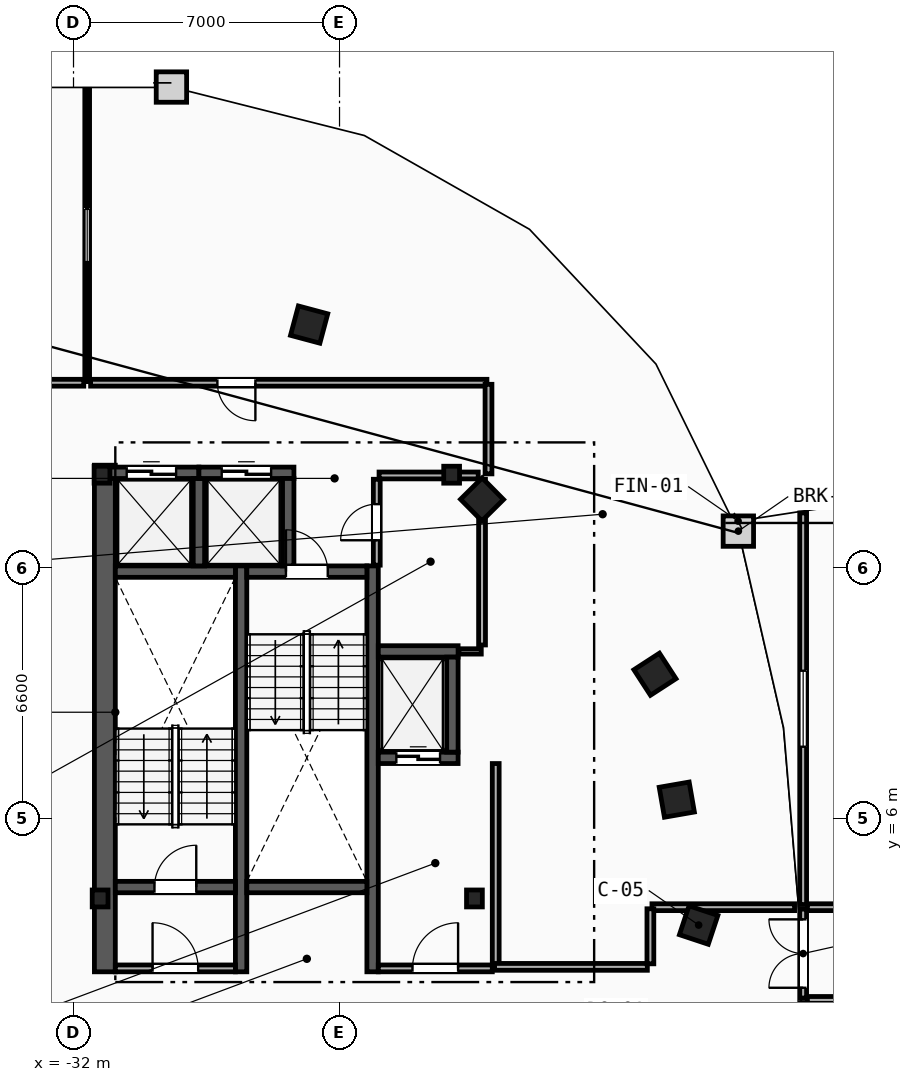
"""IFC4 building model, lengths in metres.
Left out: names, types, materials, properties, quantities, classifications, styles, units other than length and angle.
Written with IfcOpenShell. Run it as: python <this file> out.ifc"""

import sys

from ifc_helpers import new_model, si_unit, direction, frame, frame_2d, origin, origin_2d, place, context, subcontext, project, spatial, rectangle, i_section, extrude, element, fill, save


model = new_model("IFC4")
c1 = context("Model", 3, precision=1e-05, world=origin(), true_north=direction((0.0, 1.0)))
c2 = subcontext(c1, "Body", "Model", "MODEL_VIEW")
j1 = project(units=[si_unit("LENGTHUNIT", "METRE"), si_unit("PLANEANGLEUNIT", "RADIAN")], contexts=[c1])
p1 = place(None, origin())
s1 = spatial("IfcSite", under=j1, at=p1, CompositionType="ELEMENT")
p2 = place(p1, origin())
s2 = spatial("IfcBuilding", under=s1, at=p2, CompositionType="ELEMENT")
p3 = place(p2, frame((0.0, 0.0, 272.0)))
s3 = spatial("IfcBuildingStorey", under=s2, at=p3, CompositionType="ELEMENT", Elevation=272.0)
for number, where, z_axis, x_axis in (
    (1, (-31.3, 3.9, 0.0), (0.0, 0.0, 1.0), (1.0, 0.0, 0.0)),
    (2, (-21.45, 3.9, 0.0), (0.0, 0.0, 1.0), (1.0, 0.0, 0.0)),
    (3, (-22.05, 15.05, 0.0), (0.0, 0.0, 1.0), (1.0, 0.0, 0.0)),
    (4, (-31.25, 15.05, 0.0), (0.0, 0.0, 1.0), (1.0, 0.0, 0.0)),
):
    element("IfcColumn", number, at=place(p3, frame(where, z_axis=z_axis, x_axis=x_axis)), inside=s3, PredefinedType="COLUMN", context=c2, shape_type="SweptSolid", body=[
        extrude(i_section(OverallWidth=0.416, OverallDepth=0.446, WebThickness=0.039, FlangeThickness=0.063, FilletRadius=0.018, at=origin_2d()), origin(), (0.0, 0.0, 1.0), 3.6),
    ])
for number, where, z_axis, x_axis in (
    (5, (-15.55, 3.2, 0.0), (0.0, 0.0, 1.0), (0.315, 0.949, 0.0)),
    (6, (-16.125, 6.5, 0.0), (0.0, 0.0, 1.0), (-0.172, 0.985, 0.0)),
    (7, (-16.7, 9.8, 0.0), (0.0, 0.0, 1.0), (-0.544, 0.839, 0.0)),
    (8, (-21.25, 14.4, 0.0), (0.0, 0.0, 1.0), (-0.703, 0.711, 0.0)),
    (9, (-25.8, 19.0, 0.0), (0.0, 0.0, 1.0), (-0.966, 0.259, 0.0)),
):
    element("IfcColumn", number, at=place(p3, frame(where, z_axis=z_axis, x_axis=x_axis)), inside=s3, PredefinedType="COLUMN", context=c2, shape_type="SweptSolid", body=[
        extrude(rectangle(XDim=0.8, YDim=0.8, at=origin_2d()), origin(), (0.0, 0.0, 1.0), 3.34),
    ])
p4 = place(p3, frame((-31.175, 1.97, 0.0), z_axis=(0.0, 0.0, 1.0), x_axis=(0.0, 1.0, 0.0)))
e10 = element("IfcWall", 10, at=p4, inside=s3, PredefinedType="SHEAR", context=c2, shape_type="SweptSolid", body=[
    extrude(rectangle(XDim=13.33, YDim=0.55, at=frame_2d((6.665, 0.0))), origin(), (0.0, 0.0, 1.0), 3.34),
])
for number, where, z_axis, x_axis in (
    (11, (-27.59, 1.97, 0.0), (0.0, 0.0, 1.0), (0.0, 1.0, 0.0)),
    (12, (-24.13, 1.97, 0.0), (0.0, 0.0, 1.0), (0.0, 1.0, 0.0)),
):
    element("IfcWall", number, at=place(p3, frame(where, z_axis=z_axis, x_axis=x_axis)), inside=s3, PredefinedType="SHEAR", context=c2, shape_type="SweptSolid", body=[
        extrude(rectangle(XDim=10.68, YDim=0.3, at=frame_2d((5.34, 0.0))), origin(), (0.0, 0.0, 1.0), 3.34),
    ])
p5 = place(p3, frame((-30.9, 4.2, 0.0), z_axis=(0.0, 0.0, 1.0), x_axis=(1.0, 0.0, 0.0)))
e13 = element("IfcWall", 13, at=p5, inside=s3, PredefinedType="SHEAR", context=c2, shape_type="SweptSolid", body=[
    extrude(rectangle(XDim=3.16, YDim=0.3, at=frame_2d((1.58, 0.0))), origin(), (0.0, 0.0, 1.0), 3.34),
])
p6 = place(p5, frame((1.03, 0.0, 0.0)))
e14 = element("IfcOpeningElement", 14, at=p6, cuts=e13, PredefinedType="OPENING", context=c2, shape_type="SweptSolid", body=[
    extrude(rectangle(XDim=1.1, YDim=2.15, at=frame_2d((0.55, 1.075))), frame((0.0, 0.16, 0.0), z_axis=(0.0, -1.0, 0.0), x_axis=(1.0, 0.0, 0.0)), (0.0, 0.0, 1.0), 0.32),
])
p7 = place(p3, frame((-30.9, 12.5, 0.0), z_axis=(0.0, 0.0, 1.0), x_axis=(1.0, 0.0, 0.0)))
e15 = element("IfcWall", 15, at=p7, inside=s3, PredefinedType="SHEAR", context=c2, shape_type="SweptSolid", body=[
    extrude(rectangle(XDim=3.16, YDim=0.3, at=frame_2d((1.58, 0.0))), origin(), (0.0, 0.0, 1.0), 3.34),
])
p8 = place(p3, frame((-27.44, 12.5, 0.0), z_axis=(0.0, 0.0, 1.0), x_axis=(1.0, 0.0, 0.0)))
e16 = element("IfcWall", 16, at=p8, inside=s3, PredefinedType="SHEAR", context=c2, shape_type="SweptSolid", body=[
    extrude(rectangle(XDim=3.16, YDim=0.3, at=frame_2d((1.58, 0.0))), origin(), (0.0, 0.0, 1.0), 3.34),
])
p9 = place(p8, frame((1.03, 0.0, 0.0)))
e17 = element("IfcOpeningElement", 17, at=p9, cuts=e16, PredefinedType="OPENING", context=c2, shape_type="SweptSolid", body=[
    extrude(rectangle(XDim=1.1, YDim=2.15, at=frame_2d((0.55, 1.075))), frame((0.0, 0.16, 0.0), z_axis=(0.0, -1.0, 0.0), x_axis=(1.0, 0.0, 0.0)), (0.0, 0.0, 1.0), 0.32),
])
p10 = place(p3, frame((-27.44, 4.2, 0.0), z_axis=(0.0, 0.0, 1.0), x_axis=(1.0, 0.0, 0.0)))
e18 = element("IfcWall", 18, at=p10, inside=s3, PredefinedType="SHEAR", context=c2, shape_type="SweptSolid", body=[
    extrude(rectangle(XDim=3.16, YDim=0.3, at=frame_2d((1.58, 0.0))), origin(), (0.0, 0.0, 1.0), 3.34),
])
p11 = place(p3, frame((-20.89, 2.15, 0.0), z_axis=(0.0, 0.0, 1.0), x_axis=(0.0, 1.0, 0.0)))
e19 = element("IfcWall", 19, at=p11, inside=s3, PredefinedType="PARTITIONING", context=c2, shape_type="SweptSolid", body=[
    extrude(rectangle(XDim=5.3, YDim=0.18, at=frame_2d((2.65, 0.0))), origin(), (0.0, 0.0, 1.0), 3.34),
])
p12 = place(p3, frame((-23.98, 2.06, 0.0), z_axis=(0.0, 0.0, 1.0), x_axis=(1.0, 0.0, 0.0)))
e20 = element("IfcWall", 20, at=p12, inside=s3, PredefinedType="PARTITIONING", context=c2, shape_type="SweptSolid", body=[
    extrude(rectangle(XDim=3.0, YDim=0.18, at=frame_2d((1.5, 0.0))), origin(), (0.0, 0.0, 1.0), 3.34),
])
p13 = place(p12, frame((0.9, 0.0, 0.0)))
e21 = element("IfcOpeningElement", 21, at=p13, cuts=e20, PredefinedType="OPENING", context=c2, shape_type="SweptSolid", body=[
    extrude(rectangle(XDim=1.2, YDim=2.15, at=frame_2d((0.6, 1.075))), frame((0.0, 0.1, 0.0), z_axis=(0.0, -1.0, 0.0), x_axis=(1.0, 0.0, 0.0)), (0.0, 0.0, 1.0), 0.2),
])
p14 = place(p3, frame((-30.9, 2.06, 0.0), z_axis=(0.0, 0.0, 1.0), x_axis=(1.0, 0.0, 0.0)))
e22 = element("IfcWall", 22, at=p14, inside=s3, PredefinedType="PARTITIONING", context=c2, shape_type="SweptSolid", body=[
    extrude(rectangle(XDim=3.16, YDim=0.18, at=frame_2d((1.58, 0.0))), origin(), (0.0, 0.0, 1.0), 3.34),
])
p15 = place(p14, frame((0.98, 0.0, 0.0)))
e23 = element("IfcOpeningElement", 23, at=p15, cuts=e22, PredefinedType="OPENING", context=c2, shape_type="SweptSolid", body=[
    extrude(rectangle(XDim=1.2, YDim=2.15, at=frame_2d((0.6, 1.075))), frame((0.0, 0.1, 0.0), z_axis=(0.0, -1.0, 0.0), x_axis=(1.0, 0.0, 0.0)), (0.0, 0.0, 1.0), 0.2),
])
p16 = place(p3, frame((-23.98, 7.6, 0.0), z_axis=(0.0, 0.0, 1.0), x_axis=(1.0, 0.0, 0.0)))
e24 = element("IfcWall", 24, at=p16, inside=s3, PredefinedType="SHEAR", context=c2, shape_type="SweptSolid", body=[
    extrude(rectangle(XDim=2.1, YDim=0.3, at=frame_2d((1.05, 0.0))), origin(), (0.0, 0.0, 1.0), 3.34),
])
p17 = place(p16, frame((0.475, 0.0, 0.0)))
e25 = element("IfcOpeningElement", 25, at=p17, cuts=e24, PredefinedType="OPENING", context=c2, shape_type="SweptSolid", body=[
    extrude(rectangle(XDim=1.15, YDim=2.2, at=frame_2d((0.575, 1.1))), frame((0.0, 0.16, 0.0), z_axis=(0.0, -1.0, 0.0), x_axis=(1.0, 0.0, 0.0)), (0.0, 0.0, 1.0), 0.32),
])
p18 = place(p3, frame((-23.98, 10.4, 0.0), z_axis=(0.0, 0.0, 1.0), x_axis=(1.0, 0.0, 0.0)))
e26 = element("IfcWall", 26, at=p18, inside=s3, PredefinedType="SHEAR", context=c2, shape_type="SweptSolid", body=[
    extrude(rectangle(XDim=2.1, YDim=0.3, at=frame_2d((1.05, 0.0))), origin(), (0.0, 0.0, 1.0), 3.34),
])
p19 = place(p3, frame((-22.03, 7.75, 0.0), z_axis=(0.0, 0.0, 1.0), x_axis=(0.0, 1.0, 0.0)))
e27 = element("IfcWall", 27, at=p19, inside=s3, PredefinedType="SHEAR", context=c2, shape_type="SweptSolid", body=[
    extrude(rectangle(XDim=2.5, YDim=0.3, at=frame_2d((1.25, 0.0))), origin(), (0.0, 0.0, 1.0), 3.34),
])
p20 = place(p3, frame((-31.2, 15.1, 0.0), z_axis=(0.0, 0.0, 1.0), x_axis=(1.0, 0.0, 0.0)))
e28 = element("IfcWall", 28, at=p20, inside=s3, PredefinedType="SHEAR", context=c2, shape_type="SweptSolid", body=[
    extrude(rectangle(XDim=2.5, YDim=0.3, at=frame_2d((1.25, 0.0))), origin(), (0.0, 0.0, 1.0), 3.34),
])
p21 = place(p20, frame((0.6, 0.0, 0.0)))
e29 = element("IfcOpeningElement", 29, at=p21, cuts=e28, PredefinedType="OPENING", context=c2, shape_type="SweptSolid", body=[
    extrude(rectangle(XDim=1.3, YDim=2.2, at=frame_2d((0.65, 1.1))), frame((0.0, 0.16, 0.0), z_axis=(0.0, -1.0, 0.0), x_axis=(1.0, 0.0, 0.0)), (0.0, 0.0, 1.0), 0.32),
])
p22 = place(p3, frame((-28.7, 12.65, 0.0), z_axis=(0.0, 0.0, 1.0), x_axis=(0.0, 1.0, 0.0)))
e30 = element("IfcWall", 30, at=p22, inside=s3, PredefinedType="SHEAR", context=c2, shape_type="SweptSolid", body=[
    extrude(rectangle(XDim=2.3, YDim=0.3, at=frame_2d((1.15, 0.0))), origin(), (0.0, 0.0, 1.0), 3.34),
])
p23 = place(p3, frame((-28.7, 15.1, 0.0), z_axis=(0.0, 0.0, 1.0), x_axis=(1.0, 0.0, 0.0)))
e31 = element("IfcWall", 31, at=p23, inside=s3, PredefinedType="SHEAR", context=c2, shape_type="SweptSolid", body=[
    extrude(rectangle(XDim=2.5, YDim=0.3, at=frame_2d((1.25, 0.0))), origin(), (0.0, 0.0, 1.0), 3.34),
])
p24 = place(p23, frame((0.6, 0.0, 0.0)))
e32 = element("IfcOpeningElement", 32, at=p24, cuts=e31, PredefinedType="OPENING", context=c2, shape_type="SweptSolid", body=[
    extrude(rectangle(XDim=1.3, YDim=2.2, at=frame_2d((0.65, 1.1))), frame((0.0, 0.16, 0.0), z_axis=(0.0, -1.0, 0.0), x_axis=(1.0, 0.0, 0.0)), (0.0, 0.0, 1.0), 0.32),
])
p25 = place(p3, frame((-26.35, 12.65, 0.0), z_axis=(0.0, 0.0, 1.0), x_axis=(0.0, 1.0, 0.0)))
e33 = element("IfcWall", 33, at=p25, inside=s3, PredefinedType="SHEAR", context=c2, shape_type="SweptSolid", body=[
    extrude(rectangle(XDim=2.3, YDim=0.3, at=frame_2d((1.15, 0.0))), origin(), (0.0, 0.0, 1.0), 3.34),
])
p26 = place(p3, frame((-21.86, 10.4, 0.0), z_axis=(0.0, 0.0, 1.0), x_axis=(1.0, 0.0, 0.0)))
e34 = element("IfcWall", 34, at=p26, inside=s3, PredefinedType="PARTITIONING", context=c2, shape_type="SweptSolid", body=[
    extrude(rectangle(XDim=0.59, YDim=0.14, at=frame_2d((0.295, 0.0))), origin(), (0.0, 0.0, 1.0), 3.34),
])
p27 = place(p3, frame((-21.25, 10.57, 0.0), z_axis=(0.0, 0.0, 1.0), x_axis=(0.0, 1.0, 0.0)))
e35 = element("IfcWall", 35, at=p27, inside=s3, PredefinedType="PARTITIONING", context=c2, shape_type="SweptSolid", body=[
    extrude(rectangle(XDim=4.36, YDim=0.18, at=frame_2d((2.18, 0.0))), origin(), (0.0, 0.0, 1.0), 3.34),
])
p28 = place(p3, frame((-23.96, 15.03, 0.0), z_axis=(0.0, 0.0, 1.0), x_axis=(1.0, 0.0, 0.0)))
e36 = element("IfcWall", 36, at=p28, inside=s3, PredefinedType="PARTITIONING", context=c2, shape_type="SweptSolid", body=[
    extrude(rectangle(XDim=2.61, YDim=0.18, at=frame_2d((1.305, 0.0))), origin(), (0.0, 0.0, 1.0), 2.413),
])
p29 = place(p3, frame((-24.02, 12.67, 0.0), z_axis=(0.0, 0.0, 1.0), x_axis=(0.0, 1.0, 0.0)))
e37 = element("IfcWall", 37, at=p29, inside=s3, PredefinedType="PARTITIONING", context=c2, shape_type="SweptSolid", body=[
    extrude(rectangle(XDim=2.26, YDim=0.18, at=frame_2d((1.13, 0.0))), origin(), (0.0, 0.0, 1.0), 3.34),
])
p30 = place(p29, frame((0.655, 0.0, 0.0)))
e38 = element("IfcOpeningElement", 38, at=p30, cuts=e37, PredefinedType="OPENING", context=c2, shape_type="SweptSolid", body=[
    extrude(rectangle(XDim=0.95, YDim=2.1, at=frame_2d((0.475, 1.05))), frame((0.0, 0.1, 0.0), z_axis=(0.0, -1.0, 0.0), x_axis=(1.0, 0.0, 0.0)), (0.0, 0.0, 1.0), 0.2),
])
p31 = place(p3, frame((-31.64, 17.5, 0.0), z_axis=(0.0, 0.0, 1.0), x_axis=(0.0, 1.0, 0.0)))
e39 = element("IfcWall", 39, at=p31, inside=s3, PredefinedType="PARTITIONING", context=c2, shape_type="SweptSolid", body=[
    extrude(rectangle(XDim=7.69, YDim=0.125, at=frame_2d((3.845, 0.0))), origin(), (0.0, 0.0, 1.0), 3.34),
])
p32 = place(p31, frame((3.145, 0.0, 1.05)))
e40 = element("IfcOpeningElement", 40, at=p32, cuts=e39, PredefinedType="OPENING", context=c2, shape_type="SweptSolid", body=[
    extrude(rectangle(XDim=1.4, YDim=1.5, at=frame_2d((0.7, 0.75))), frame((0.0, 0.073, 0.0), z_axis=(0.0, -1.0, 0.0), x_axis=(1.0, 0.0, 0.0)), (0.0, 0.0, 1.0), 0.145),
])
p33 = place(p3, frame((-31.73, 17.47, 0.0), z_axis=(0.0, 0.0, 1.0), x_axis=(-1.0, 0.0, 0.0)))
e41 = element("IfcWall", 41, at=p33, inside=s3, PredefinedType="PARTITIONING", context=c2, shape_type="SweptSolid", body=[
    extrude(rectangle(XDim=1.898, YDim=0.18, at=frame_2d((0.949, 0.0))), origin(), (0.0, 0.0, 1.0), 3.34),
])
p34 = place(p3, frame((-21.122, 17.47, 0.0), z_axis=(0.0, 0.0, 1.0), x_axis=(-1.0, 0.0, 0.0)))
e42 = element("IfcWall", 42, at=p34, inside=s3, PredefinedType="PARTITIONING", context=c2, shape_type="SweptSolid", body=[
    extrude(rectangle(XDim=10.428, YDim=0.18, at=frame_2d((5.214, 0.0))), origin(), (0.0, 0.0, 1.0), 3.34),
])
p35 = place(p34, frame((6.093, 0.0, 0.0)))
e43 = element("IfcOpeningElement", 43, at=p35, cuts=e42, PredefinedType="OPENING", context=c2, shape_type="SweptSolid", body=[
    extrude(rectangle(XDim=1.0, YDim=2.15, at=frame_2d((0.5, 1.075))), frame((0.0, 0.1, 0.0), z_axis=(0.0, -1.0, 0.0), x_axis=(1.0, 0.0, 0.0)), (0.0, 0.0, 1.0), 0.2),
])
p36 = place(p3, frame((-16.9, 2.1, 0.0), z_axis=(0.0, 0.0, 1.0), x_axis=(-1.0, 0.0, 0.0)))
e44 = element("IfcWall", 44, at=p36, inside=s3, PredefinedType="PARTITIONING", context=c2, shape_type="SweptSolid", body=[
    extrude(rectangle(XDim=4.02, YDim=0.18, at=frame_2d((2.01, 0.0))), origin(), (0.0, 0.0, 1.0), 3.34),
])
p37 = place(p3, frame((-13.026, 3.67, 0.0), z_axis=(0.0, 0.0, 1.0), x_axis=(-1.0, 0.0, 0.0)))
e45 = element("IfcWall", 45, at=p37, inside=s3, PredefinedType="PARTITIONING", context=c2, shape_type="SweptSolid", body=[
    extrude(rectangle(XDim=3.753, YDim=0.18, at=frame_2d((1.876, 0.0))), origin(), (0.0, 0.0, 1.0), 3.34),
])
p38 = place(p3, frame((-21.08, 15.072, 0.0), z_axis=(0.0, 0.0, 1.0), x_axis=(0.0, 1.0, 0.0)))
e46 = element("IfcWall", 46, at=p38, inside=s3, PredefinedType="PARTITIONING", context=c2, shape_type="SweptSolid", body=[
    extrude(rectangle(XDim=2.357, YDim=0.18, at=frame_2d((1.178, 0.0))), origin(), (0.0, 0.0, 1.0), 3.34),
])
p39 = place(p3, frame((-16.82, 3.628, 0.0), z_axis=(0.0, 0.0, 1.0), x_axis=(0.0, -1.0, 0.0)))
e47 = element("IfcWall", 47, at=p39, inside=s3, PredefinedType="PARTITIONING", context=c2, shape_type="SweptSolid", body=[
    extrude(rectangle(XDim=1.448, YDim=0.18, at=frame_2d((0.724, 0.0))), origin(), (0.0, 0.0, 1.0), 3.34),
])
p40 = place(p3, frame((-12.688, 1.23, 0.0), z_axis=(0.0, 0.0, 1.0), x_axis=(1.0, 0.0, 0.0)))
e48 = element("IfcWall", 48, at=p40, inside=s3, PredefinedType="PARTITIONING", context=c2, shape_type="SweptSolid", body=[
    extrude(rectangle(XDim=15.193, YDim=0.18, at=frame_2d((7.597, 0.0))), origin(), (0.0, 0.0, 1.0), 2.713),
])
p41 = place(p40, frame((6.797, 0.0, 0.0)))
e49 = element("IfcOpeningElement", 49, at=p41, cuts=e48, PredefinedType="OPENING", context=c2, shape_type="SweptSolid", body=[
    extrude(rectangle(XDim=1.6, YDim=2.2, at=frame_2d((0.8, 1.1))), frame((0.0, 0.1, 0.0), z_axis=(0.0, -1.0, 0.0), x_axis=(1.0, 0.0, 0.0)), (0.0, 0.0, 1.0), 0.2),
])
p42 = place(p3, frame((2.505, 3.67, 0.0), z_axis=(0.0, 0.0, 1.0), x_axis=(-1.0, 0.0, 0.0)))
e50 = element("IfcWall", 50, at=p42, inside=s3, PredefinedType="PARTITIONING", context=c2, shape_type="SweptSolid", body=[
    extrude(rectangle(XDim=15.193, YDim=0.18, at=frame_2d((7.597, 0.0))), origin(), (0.0, 0.0, 1.0), 3.34),
])
p43 = place(p42, frame((6.797, 0.0, 0.0)))
e51 = element("IfcOpeningElement", 51, at=p43, cuts=e50, PredefinedType="OPENING", context=c2, shape_type="SweptSolid", body=[
    extrude(rectangle(XDim=1.6, YDim=2.2, at=frame_2d((0.8, 1.1))), frame((0.0, 0.1, 0.0), z_axis=(0.0, -1.0, 0.0), x_axis=(1.0, 0.0, 0.0)), (0.0, 0.0, 1.0), 0.2),
])
p44 = place(p3, frame((-12.8, -0.285, 0.0), z_axis=(0.0, 0.0, 1.0), x_axis=(0.0, 1.0, 0.0)))
e52 = element("IfcWall", 52, at=p44, inside=s3, PredefinedType="PARTITIONING", context=c2, shape_type="SweptSolid", body=[
    extrude(rectangle(XDim=1.445, YDim=0.18, at=frame_2d((0.722, 0.0))), origin(), (0.0, 0.0, 1.0), 3.34),
])
p45 = place(p3, frame((-12.8, 3.74, 0.0), z_axis=(0.0, 0.0, 1.0), x_axis=(0.0, 1.0, 0.0)))
e53 = element("IfcWall", 53, at=p45, inside=s3, PredefinedType="PARTITIONING", context=c2, shape_type="SweptSolid", body=[
    extrude(rectangle(XDim=10.304, YDim=0.18, at=frame_2d((5.152, 0.0))), origin(), (0.0, 0.0, 1.0), 3.34),
])
p46 = place(p45, frame((4.152, 0.0, 1.05)))
e54 = element("IfcOpeningElement", 54, at=p46, cuts=e53, PredefinedType="OPENING", context=c2, shape_type="SweptSolid", body=[
    extrude(rectangle(XDim=2.0, YDim=1.5, at=frame_2d((1.0, 0.75))), frame((0.0, 0.1, 0.0), z_axis=(0.0, -1.0, 0.0), x_axis=(1.0, 0.0, 0.0)), (0.0, 0.0, 1.0), 0.2),
])
p47 = place(p3, frame((-12.8, 1.28, 0.0), z_axis=(0.0, 0.0, 1.0), x_axis=(0.0, 1.0, 0.0)))
e55 = element("IfcWall", 55, at=p47, inside=s3, PredefinedType="PARTITIONING", context=c2, shape_type="SweptSolid", body=[
    extrude(rectangle(XDim=2.34, YDim=0.18, at=frame_2d((1.17, 0.0))), origin(), (0.0, 0.0, 1.0), 3.34),
])
p48 = place(p47, frame((0.27, 0.0, 0.0)))
e56 = element("IfcOpeningElement", 56, at=p48, cuts=e55, PredefinedType="OPENING", context=c2, shape_type="SweptSolid", body=[
    extrude(rectangle(XDim=1.8, YDim=2.25, at=frame_2d((0.9, 1.125))), frame((0.0, 0.1, 0.0), z_axis=(0.0, -1.0, 0.0), x_axis=(1.0, 0.0, 0.0)), (0.0, 0.0, 1.0), 0.2),
])
p49 = place(p6, origin())
e57 = element("IfcDoor", 57, at=p49, inside=s3, OperationType="SINGLE_SWING_RIGHT", PredefinedType="DOOR", context=c2, shape_type="SweptSolid", body=[
    extrude(rectangle(XDim=1.1, YDim=2.15, at=frame_2d((0.55, 1.075))), frame((0.0, 0.025, 0.0), z_axis=(0.0, -1.0, 0.0), x_axis=(1.0, 0.0, 0.0)), (0.0, 0.0, 1.0), 0.05),
])
fill(e14, e57)
p50 = place(p9, origin())
e58 = element("IfcDoor", 58, at=p50, inside=s3, OperationType="SINGLE_SWING_LEFT", PredefinedType="DOOR", context=c2, shape_type="SweptSolid", body=[
    extrude(rectangle(XDim=1.1, YDim=2.15, at=frame_2d((0.55, 1.075))), frame((0.0, 0.025, 0.0), z_axis=(0.0, -1.0, 0.0), x_axis=(1.0, 0.0, 0.0)), (0.0, 0.0, 1.0), 0.05),
])
fill(e17, e58)
p51 = place(p13, origin())
e59 = element("IfcDoor", 59, at=p51, inside=s3, OperationType="SINGLE_SWING_RIGHT", PredefinedType="DOOR", context=c2, shape_type="SweptSolid", body=[
    extrude(rectangle(XDim=1.2, YDim=2.15, at=frame_2d((0.6, 1.075))), frame((0.0, 0.025, 0.0), z_axis=(0.0, -1.0, 0.0), x_axis=(1.0, 0.0, 0.0)), (0.0, 0.0, 1.0), 0.05),
])
fill(e21, e59)
p52 = place(p15, origin())
e60 = element("IfcDoor", 60, at=p52, inside=s3, OperationType="SINGLE_SWING_LEFT", PredefinedType="DOOR", context=c2, shape_type="SweptSolid", body=[
    extrude(rectangle(XDim=1.2, YDim=2.15, at=frame_2d((0.6, 1.075))), frame((0.0, 0.025, 0.0), z_axis=(0.0, -1.0, 0.0), x_axis=(1.0, 0.0, 0.0)), (0.0, 0.0, 1.0), 0.05),
])
fill(e23, e60)
p53 = place(p17, origin())
e61 = element("IfcDoor", 61, at=p53, inside=s3, OperationType="SLIDING_TO_LEFT", PredefinedType="TRAPDOOR", context=c2, shape_type="SweptSolid", body=[
    extrude(rectangle(XDim=1.15, YDim=2.2, at=frame_2d((0.575, 1.1))), frame((0.0, 0.025, 0.0), z_axis=(0.0, -1.0, 0.0), x_axis=(1.0, 0.0, 0.0)), (0.0, 0.0, 1.0), 0.05),
])
fill(e25, e61)
p54 = place(p21, origin())
e62 = element("IfcDoor", 62, at=p54, inside=s3, OperationType="SLIDING_TO_LEFT", PredefinedType="TRAPDOOR", context=c2, shape_type="SweptSolid", body=[
    extrude(rectangle(XDim=1.3, YDim=2.2, at=frame_2d((0.65, 1.1))), frame((0.0, 0.025, 0.0), z_axis=(0.0, -1.0, 0.0), x_axis=(1.0, 0.0, 0.0)), (0.0, 0.0, 1.0), 0.05),
])
fill(e29, e62)
p55 = place(p24, origin())
e63 = element("IfcDoor", 63, at=p55, inside=s3, OperationType="SLIDING_TO_LEFT", PredefinedType="TRAPDOOR", context=c2, shape_type="SweptSolid", body=[
    extrude(rectangle(XDim=1.3, YDim=2.2, at=frame_2d((0.65, 1.1))), frame((0.0, 0.025, 0.0), z_axis=(0.0, -1.0, 0.0), x_axis=(1.0, 0.0, 0.0)), (0.0, 0.0, 1.0), 0.05),
])
fill(e32, e63)
p56 = place(p35, origin())
e64 = element("IfcDoor", 64, at=p56, inside=s3, OperationType="SINGLE_SWING_LEFT", PredefinedType="DOOR", context=c2, shape_type="SweptSolid", body=[
    extrude(rectangle(XDim=1.0, YDim=2.15, at=frame_2d((0.5, 1.075))), frame((0.0, 0.025, 0.0), z_axis=(0.0, -1.0, 0.0), x_axis=(1.0, 0.0, 0.0)), (0.0, 0.0, 1.0), 0.05),
])
fill(e43, e64)
p57 = place(p48, origin())
e65 = element("IfcDoor", 65, at=p57, inside=s3, OperationType="DOUBLE_DOOR_SINGLE_SWING", PredefinedType="DOOR", context=c2, shape_type="SweptSolid", body=[
    extrude(rectangle(XDim=1.8, YDim=2.25, at=frame_2d((0.9, 1.125))), frame((0.0, 0.025, 0.0), z_axis=(0.0, -1.0, 0.0), x_axis=(1.0, 0.0, 0.0)), (0.0, 0.0, 1.0), 0.05),
])
fill(e56, e65)
p58 = place(p30, origin())
e66 = element("IfcDoor", 66, at=p58, inside=s3, OperationType="SINGLE_SWING_LEFT", PredefinedType="DOOR", context=c2, shape_type="SweptSolid", body=[
    extrude(rectangle(XDim=0.95, YDim=2.1, at=frame_2d((0.475, 1.05))), frame((0.0, 0.025, 0.0), z_axis=(0.0, -1.0, 0.0), x_axis=(1.0, 0.0, 0.0)), (0.0, 0.0, 1.0), 0.05),
])
fill(e38, e66)
p59 = place(p32, origin())
e67 = element("IfcWindow", 67, at=p59, inside=s3, PartitioningType="SINGLE_PANEL", PredefinedType="WINDOW", context=c2, shape_type="SweptSolid", body=[
    extrude(rectangle(XDim=1.4, YDim=1.5, at=frame_2d((0.7, 0.75))), frame((0.0, 0.03, 0.0), z_axis=(0.0, -1.0, 0.0), x_axis=(1.0, 0.0, 0.0)), (0.0, 0.0, 1.0), 0.06),
])
fill(e40, e67)
p60 = place(p46, origin())
e68 = element("IfcWindow", 68, at=p60, inside=s3, PartitioningType="SINGLE_PANEL", PredefinedType="WINDOW", context=c2, shape_type="SweptSolid", body=[
    extrude(rectangle(XDim=2.0, YDim=1.5, at=frame_2d((1.0, 0.75))), frame((0.0, 0.03, 0.0), z_axis=(0.0, -1.0, 0.0), x_axis=(1.0, 0.0, 0.0)), (0.0, 0.0, 1.0), 0.06),
])
fill(e54, e68)
save(model, sys.argv[1])
